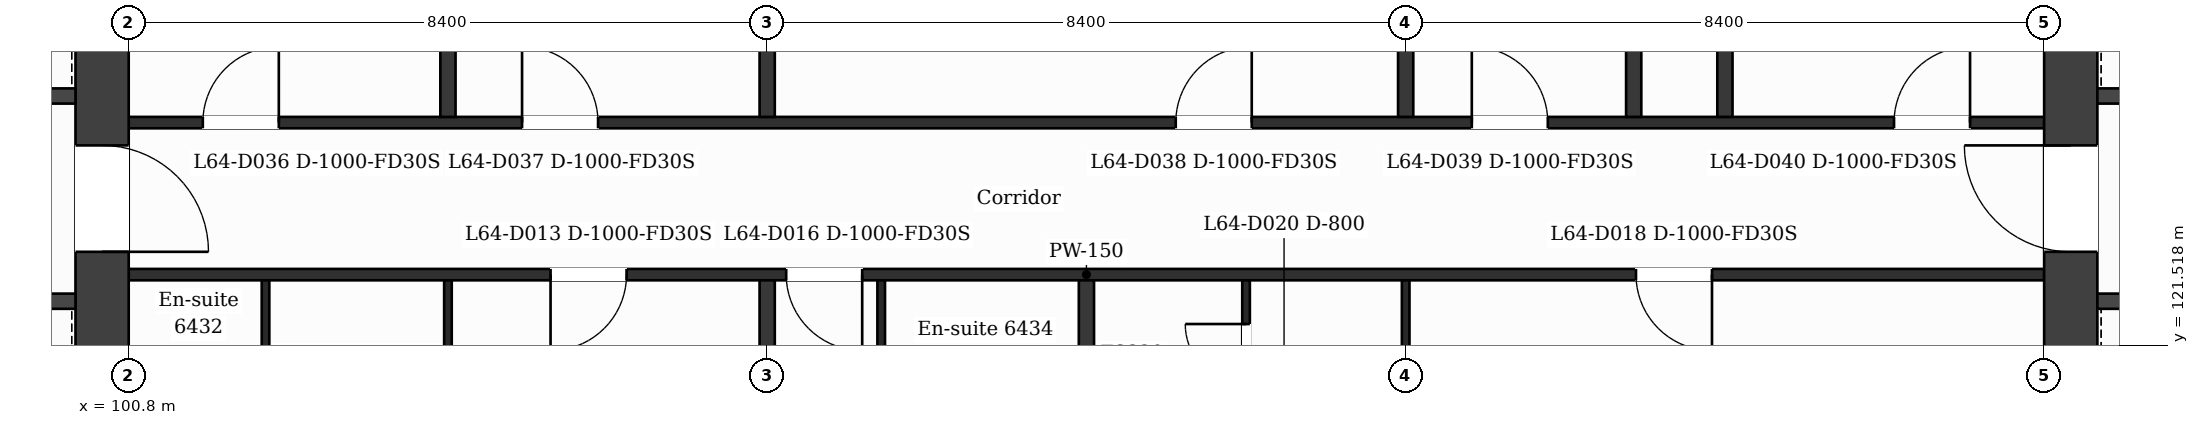
"""IFC4 building model, lengths in metres.
Left out: names, types, materials, properties, quantities, classifications, styles, units other than length and angle.
Written with IfcOpenShell. Run it as: python <this file> out.ifc"""

import sys

from ifc_helpers import new_model, si_unit, direction, frame, frame_2d, origin, place, context, subcontext, project, spatial, rectangle, extrude, element, fill, save


model = new_model("IFC4")
c1 = context("Model", 3, precision=1e-05, world=origin(), true_north=direction((0.0, 1.0)))
c2 = subcontext(c1, "Body", "Model", "MODEL_VIEW")
j1 = project(units=[si_unit("LENGTHUNIT", "METRE"), si_unit("PLANEANGLEUNIT", "RADIAN")], contexts=[c1])
p1 = place(None, origin())
s1 = spatial("IfcSite", under=j1, at=p1, CompositionType="ELEMENT")
p2 = place(p1, origin())
s2 = spatial("IfcBuilding", under=s1, at=p2, CompositionType="ELEMENT")
p3 = place(p2, frame((0.0, 0.0, 266.4)))
s3 = spatial("IfcBuildingStorey", under=s2, at=p3, CompositionType="ELEMENT", Elevation=266.4)
p4 = place(p3, frame((100.45, 132.05, 0.0), z_axis=(0.0, 0.0, 1.0), x_axis=(0.0, -1.0, 0.0)))
e1 = element("IfcWall", 1, at=p4, inside=s3, PredefinedType="SHEAR", context=c2, shape_type="SweptSolid", body=[
    extrude(rectangle(XDim=21.3, YDim=0.7, at=frame_2d((10.65, 0.0))), origin(), (0.0, 0.0, 1.0), 3.7),
])
p5 = place(p4, frame((7.9, 0.0, 0.0)))
e2 = element("IfcOpeningElement", 2, at=p5, cuts=e1, PredefinedType="OPENING", context=c2, shape_type="SweptSolid", body=[
    extrude(rectangle(XDim=1.4, YDim=2.1, at=frame_2d((0.7, 1.05))), frame((0.0, 0.36, 0.0), z_axis=(0.0, -1.0, 0.0), x_axis=(1.0, 0.0, 0.0)), (0.0, 0.0, 1.0), 0.72),
])
p6 = place(p3, frame((126.35, 110.75, 0.0), z_axis=(0.0, 0.0, 1.0), x_axis=(0.0, 1.0, 0.0)))
e3 = element("IfcWall", 3, at=p6, inside=s3, PredefinedType="SHEAR", context=c2, shape_type="SweptSolid", body=[
    extrude(rectangle(XDim=21.3, YDim=0.7, at=frame_2d((10.65, 0.0))), origin(), (0.0, 0.0, 1.0), 3.7),
])
p7 = place(p6, frame((12.0, 0.0, 0.0)))
e4 = element("IfcOpeningElement", 4, at=p7, cuts=e3, PredefinedType="OPENING", context=c2, shape_type="SweptSolid", body=[
    extrude(rectangle(XDim=1.4, YDim=2.1, at=frame_2d((0.7, 1.05))), frame((0.0, 0.36, 0.0), z_axis=(0.0, -1.0, 0.0), x_axis=(1.0, 0.0, 0.0)), (0.0, 0.0, 1.0), 0.72),
])
p8 = place(p3, frame((95.227, 122.1, 0.0), z_axis=(0.0, 0.0, 1.0), x_axis=(1.0, 0.0, 0.0)))
e5 = element("IfcWall", 5, at=p8, inside=s3, PredefinedType="PARTITIONING", context=c2, shape_type="SweptSolid", body=[
    extrude(rectangle(XDim=4.873, YDim=0.2, at=frame_2d((2.437, 0.0))), origin(), (0.0, 0.0, 1.0), 3.38),
])
p9 = place(p8, frame((0.827, 0.0, 0.0)))
e6 = element("IfcOpeningElement", 6, at=p9, cuts=e5, PredefinedType="OPENING", context=c2, shape_type="SweptSolid", body=[
    extrude(rectangle(XDim=1.1, YDim=2.1, at=frame_2d((0.55, 1.05))), frame((0.0, 0.11, 0.0), z_axis=(0.0, -1.0, 0.0), x_axis=(1.0, 0.0, 0.0)), (0.0, 0.0, 1.0), 0.22),
])
p10 = place(p8, frame((2.946, 0.0, 0.0)))
e7 = element("IfcOpeningElement", 7, at=p10, cuts=e5, PredefinedType="OPENING", context=c2, shape_type="SweptSolid", body=[
    extrude(rectangle(XDim=1.1, YDim=2.1, at=frame_2d((0.55, 1.05))), frame((0.0, 0.11, 0.0), z_axis=(0.0, -1.0, 0.0), x_axis=(1.0, 0.0, 0.0)), (0.0, 0.0, 1.0), 0.22),
])
p11 = place(p3, frame((126.7, 122.1, 0.0), z_axis=(0.0, 0.0, 1.0), x_axis=(1.0, 0.0, 0.0)))
e8 = element("IfcWall", 8, at=p11, inside=s3, PredefinedType="PARTITIONING", context=c2, shape_type="SweptSolid", body=[
    extrude(rectangle(XDim=4.873, YDim=0.2, at=frame_2d((2.437, 0.0))), origin(), (0.0, 0.0, 1.0), 3.38),
])
p12 = place(p11, frame((3.105, 0.0, 0.0)))
e9 = element("IfcOpeningElement", 9, at=p12, cuts=e8, PredefinedType="OPENING", context=c2, shape_type="SweptSolid", body=[
    extrude(rectangle(XDim=1.1, YDim=2.1, at=frame_2d((0.55, 1.05))), frame((0.0, 0.11, 0.0), z_axis=(0.0, -1.0, 0.0), x_axis=(1.0, 0.0, 0.0)), (0.0, 0.0, 1.0), 0.22),
])
p13 = place(p11, frame((0.509, 0.0, 0.0)))
e10 = element("IfcOpeningElement", 10, at=p13, cuts=e8, PredefinedType="OPENING", context=c2, shape_type="SweptSolid", body=[
    extrude(rectangle(XDim=1.1, YDim=2.1, at=frame_2d((0.55, 1.05))), frame((0.0, 0.11, 0.0), z_axis=(0.0, -1.0, 0.0), x_axis=(1.0, 0.0, 0.0)), (0.0, 0.0, 1.0), 0.22),
])
p14 = place(p3, frame((100.8, 122.45, 0.0), z_axis=(0.0, 0.0, 1.0), x_axis=(1.0, 0.0, 0.0)))
e11 = element("IfcWall", 11, at=p14, inside=s3, PredefinedType="PARTITIONING", context=c2, shape_type="SweptSolid", body=[
    extrude(rectangle(XDim=25.2, YDim=0.15, at=frame_2d((12.6, 0.0))), origin(), (0.0, 0.0, 1.0), 3.38),
])
p15 = place(p14, frame((5.55, 0.0, 0.0)))
e12 = element("IfcOpeningElement", 12, at=p15, cuts=e11, PredefinedType="OPENING", context=c2, shape_type="SweptSolid", body=[
    extrude(rectangle(XDim=1.0, YDim=2.1, at=frame_2d((0.5, 1.05))), frame((0.0, 0.085, 0.0), z_axis=(0.0, -1.0, 0.0), x_axis=(1.0, 0.0, 0.0)), (0.0, 0.0, 1.0), 0.17),
])
p16 = place(p14, frame((8.65, 0.0, 0.0)))
e13 = element("IfcOpeningElement", 13, at=p16, cuts=e11, PredefinedType="OPENING", context=c2, shape_type="SweptSolid", body=[
    extrude(rectangle(XDim=1.0, YDim=2.1, at=frame_2d((0.5, 1.05))), frame((0.0, 0.085, 0.0), z_axis=(0.0, -1.0, 0.0), x_axis=(1.0, 0.0, 0.0)), (0.0, 0.0, 1.0), 0.17),
])
p17 = place(p14, frame((19.83, 0.0, 0.0)))
e14 = element("IfcOpeningElement", 14, at=p17, cuts=e11, PredefinedType="OPENING", context=c2, shape_type="SweptSolid", body=[
    extrude(rectangle(XDim=1.0, YDim=2.1, at=frame_2d((0.5, 1.05))), frame((0.0, 0.085, 0.0), z_axis=(0.0, -1.0, 0.0), x_axis=(1.0, 0.0, 0.0)), (0.0, 0.0, 1.0), 0.17),
])
p18 = place(p3, frame((100.8, 124.45, 0.0), z_axis=(0.0, 0.0, 1.0), x_axis=(1.0, 0.0, 0.0)))
e15 = element("IfcWall", 15, at=p18, inside=s3, PredefinedType="PARTITIONING", context=c2, shape_type="SweptSolid", body=[
    extrude(rectangle(XDim=25.2, YDim=0.15, at=frame_2d((12.6, 0.0))), origin(), (0.0, 0.0, 1.0), 3.38),
])
p19 = place(p18, frame((0.975, 0.0, 0.0)))
e16 = element("IfcOpeningElement", 16, at=p19, cuts=e15, PredefinedType="OPENING", context=c2, shape_type="SweptSolid", body=[
    extrude(rectangle(XDim=1.0, YDim=2.1, at=frame_2d((0.5, 1.05))), frame((0.0, 0.085, 0.0), z_axis=(0.0, -1.0, 0.0), x_axis=(1.0, 0.0, 0.0)), (0.0, 0.0, 1.0), 0.17),
])
p20 = place(p18, frame((5.175, 0.0, 0.0)))
e17 = element("IfcOpeningElement", 17, at=p20, cuts=e15, PredefinedType="OPENING", context=c2, shape_type="SweptSolid", body=[
    extrude(rectangle(XDim=1.0, YDim=2.1, at=frame_2d((0.5, 1.05))), frame((0.0, 0.085, 0.0), z_axis=(0.0, -1.0, 0.0), x_axis=(1.0, 0.0, 0.0)), (0.0, 0.0, 1.0), 0.17),
])
p21 = place(p18, frame((13.775, 0.0, 0.0)))
e18 = element("IfcOpeningElement", 18, at=p21, cuts=e15, PredefinedType="OPENING", context=c2, shape_type="SweptSolid", body=[
    extrude(rectangle(XDim=1.0, YDim=2.1, at=frame_2d((0.5, 1.05))), frame((0.0, 0.085, 0.0), z_axis=(0.0, -1.0, 0.0), x_axis=(1.0, 0.0, 0.0)), (0.0, 0.0, 1.0), 0.17),
])
p22 = place(p18, frame((17.67, 0.0, 0.0)))
e19 = element("IfcOpeningElement", 19, at=p22, cuts=e15, PredefinedType="OPENING", context=c2, shape_type="SweptSolid", body=[
    extrude(rectangle(XDim=1.0, YDim=2.1, at=frame_2d((0.5, 1.05))), frame((0.0, 0.085, 0.0), z_axis=(0.0, -1.0, 0.0), x_axis=(1.0, 0.0, 0.0)), (0.0, 0.0, 1.0), 0.17),
])
p23 = place(p18, frame((23.225, 0.0, 0.0)))
e20 = element("IfcOpeningElement", 20, at=p23, cuts=e15, PredefinedType="OPENING", context=c2, shape_type="SweptSolid", body=[
    extrude(rectangle(XDim=1.0, YDim=2.1, at=frame_2d((0.5, 1.05))), frame((0.0, 0.085, 0.0), z_axis=(0.0, -1.0, 0.0), x_axis=(1.0, 0.0, 0.0)), (0.0, 0.0, 1.0), 0.17),
])
p24 = place(p3, frame((92.702, 124.8, 0.0), z_axis=(0.0, 0.0, 1.0), x_axis=(1.0, 0.0, 0.0)))
e21 = element("IfcWall", 21, at=p24, inside=s3, PredefinedType="PARTITIONING", context=c2, shape_type="SweptSolid", body=[
    extrude(rectangle(XDim=7.398, YDim=0.2, at=frame_2d((3.699, 0.0))), origin(), (0.0, 0.0, 1.0), 3.38),
])
p25 = place(p24, frame((5.636, 0.0, 0.0)))
e22 = element("IfcOpeningElement", 22, at=p25, cuts=e21, PredefinedType="OPENING", context=c2, shape_type="SweptSolid", body=[
    extrude(rectangle(XDim=1.1, YDim=2.1, at=frame_2d((0.55, 1.05))), frame((0.0, 0.11, 0.0), z_axis=(0.0, -1.0, 0.0), x_axis=(1.0, 0.0, 0.0)), (0.0, 0.0, 1.0), 0.22),
])
p26 = place(p3, frame((126.7, 124.8, 0.0), z_axis=(0.0, 0.0, 1.0), x_axis=(1.0, 0.0, 0.0)))
e23 = element("IfcWall", 23, at=p26, inside=s3, PredefinedType="PARTITIONING", context=c2, shape_type="SweptSolid", body=[
    extrude(rectangle(XDim=4.849, YDim=0.2, at=frame_2d((2.424, 0.0))), origin(), (0.0, 0.0, 1.0), 3.38),
])
p27 = place(p26, frame((0.725, 0.0, 0.0)))
e24 = element("IfcOpeningElement", 24, at=p27, cuts=e23, PredefinedType="OPENING", context=c2, shape_type="SweptSolid", body=[
    extrude(rectangle(XDim=1.1, YDim=2.1, at=frame_2d((0.55, 1.05))), frame((0.0, 0.11, 0.0), z_axis=(0.0, -1.0, 0.0), x_axis=(1.0, 0.0, 0.0)), (0.0, 0.0, 1.0), 0.22),
])
p28 = place(p3, frame((102.6, 119.8, 0.0), z_axis=(0.0, 0.0, 1.0), x_axis=(0.0, 1.0, 0.0)))
e25 = element("IfcWall", 25, at=p28, inside=s3, PredefinedType="PARTITIONING", context=c2, shape_type="SweptSolid", body=[
    extrude(rectangle(XDim=2.575, YDim=0.1, at=frame_2d((1.288, 0.0))), origin(), (0.0, 0.0, 1.0), 3.38),
])
p29 = place(p28, frame((0.78, 0.0, 0.0)))
e26 = element("IfcOpeningElement", 26, at=p29, cuts=e25, PredefinedType="OPENING", context=c2, shape_type="SweptSolid", body=[
    extrude(rectangle(XDim=0.8, YDim=2.1, at=frame_2d((0.4, 1.05))), frame((0.0, 0.06, 0.0), z_axis=(0.0, -1.0, 0.0), x_axis=(1.0, 0.0, 0.0)), (0.0, 0.0, 1.0), 0.12),
])
p30 = place(p3, frame((105.0, 110.55, 0.0), z_axis=(0.0, 0.0, 1.0), x_axis=(0.0, 1.0, 0.0)))
e27 = element("IfcWall", 27, at=p30, inside=s3, PredefinedType="PARTITIONING", context=c2, shape_type="SweptSolid", body=[
    extrude(rectangle(XDim=11.825, YDim=0.1, at=frame_2d((5.913, 0.0))), origin(), (0.0, 0.0, 1.0), 3.38),
])
p31 = place(p30, frame((9.09, 0.0, 0.0)))
e28 = element("IfcOpeningElement", 28, at=p31, cuts=e27, PredefinedType="OPENING", context=c2, shape_type="SweptSolid", body=[
    extrude(rectangle(XDim=0.9, YDim=2.1, at=frame_2d((0.45, 1.05))), frame((0.0, 0.06, 0.0), z_axis=(0.0, -1.0, 0.0), x_axis=(1.0, 0.0, 0.0)), (0.0, 0.0, 1.0), 0.12),
])
p32 = place(p3, frame((105.0, 124.525, 0.0), z_axis=(0.0, 0.0, 1.0), x_axis=(0.0, 1.0, 0.0)))
e29 = element("IfcWall", 29, at=p32, inside=s3, PredefinedType="PARTITIONING", context=c2, shape_type="SweptSolid", body=[
    extrude(rectangle(XDim=9.2, YDim=0.2, at=frame_2d((4.6, 0.0))), origin(), (0.0, 0.0, 1.0), 3.38),
])
p33 = place(p3, frame((109.2, 110.55, 0.0), z_axis=(0.0, 0.0, 1.0), x_axis=(0.0, 1.0, 0.0)))
e30 = element("IfcWall", 30, at=p33, inside=s3, PredefinedType="PARTITIONING", context=c2, shape_type="SweptSolid", body=[
    extrude(rectangle(XDim=11.825, YDim=0.2, at=frame_2d((5.913, 0.0))), origin(), (0.0, 0.0, 1.0), 3.38),
])
p34 = place(p3, frame((109.2, 124.525, 0.0), z_axis=(0.0, 0.0, 1.0), x_axis=(0.0, 1.0, 0.0)))
e31 = element("IfcWall", 31, at=p34, inside=s3, PredefinedType="PARTITIONING", context=c2, shape_type="SweptSolid", body=[
    extrude(rectangle(XDim=9.2, YDim=0.2, at=frame_2d((4.6, 0.0))), origin(), (0.0, 0.0, 1.0), 3.38),
])
p35 = place(p3, frame((110.7, 120.4, 0.0), z_axis=(0.0, 0.0, 1.0), x_axis=(0.0, 1.0, 0.0)))
e32 = element("IfcWall", 32, at=p35, inside=s3, PredefinedType="PARTITIONING", context=c2, shape_type="SweptSolid", body=[
    extrude(rectangle(XDim=1.975, YDim=0.1, at=frame_2d((0.988, 0.0))), origin(), (0.0, 0.0, 1.0), 3.38),
])
p36 = place(p3, frame((113.4, 110.55, 0.0), z_axis=(0.0, 0.0, 1.0), x_axis=(0.0, 1.0, 0.0)))
e33 = element("IfcWall", 33, at=p36, inside=s3, PredefinedType="PARTITIONING", context=c2, shape_type="SweptSolid", body=[
    extrude(rectangle(XDim=11.825, YDim=0.2, at=frame_2d((5.913, 0.0))), origin(), (0.0, 0.0, 1.0), 3.38),
])
p37 = place(p3, frame((115.5, 119.8, 0.0), z_axis=(0.0, 0.0, 1.0), x_axis=(0.0, 1.0, 0.0)))
e34 = element("IfcWall", 34, at=p37, inside=s3, PredefinedType="PARTITIONING", context=c2, shape_type="SweptSolid", body=[
    extrude(rectangle(XDim=2.575, YDim=0.1, at=frame_2d((1.288, 0.0))), origin(), (0.0, 0.0, 1.0), 3.38),
])
p38 = place(p37, frame((1.2, 0.0, 0.0)))
e35 = element("IfcOpeningElement", 35, at=p38, cuts=e34, PredefinedType="OPENING", context=c2, shape_type="SweptSolid", body=[
    extrude(rectangle(XDim=0.8, YDim=2.1, at=frame_2d((0.4, 1.05))), frame((0.0, 0.06, 0.0), z_axis=(0.0, -1.0, 0.0), x_axis=(1.0, 0.0, 0.0)), (0.0, 0.0, 1.0), 0.12),
])
p39 = place(p3, frame((117.6, 110.55, 0.0), z_axis=(0.0, 0.0, 1.0), x_axis=(0.0, 1.0, 0.0)))
e36 = element("IfcWall", 36, at=p39, inside=s3, PredefinedType="PARTITIONING", context=c2, shape_type="SweptSolid", body=[
    extrude(rectangle(XDim=11.825, YDim=0.1, at=frame_2d((5.913, 0.0))), origin(), (0.0, 0.0, 1.0), 3.38),
])
p40 = place(p39, frame((9.09, 0.0, 0.0)))
e37 = element("IfcOpeningElement", 37, at=p40, cuts=e36, PredefinedType="OPENING", context=c2, shape_type="SweptSolid", body=[
    extrude(rectangle(XDim=0.9, YDim=2.1, at=frame_2d((0.45, 1.05))), frame((0.0, 0.06, 0.0), z_axis=(0.0, -1.0, 0.0), x_axis=(1.0, 0.0, 0.0)), (0.0, 0.0, 1.0), 0.12),
])
p41 = place(p3, frame((117.6, 124.525, 0.0), z_axis=(0.0, 0.0, 1.0), x_axis=(0.0, 1.0, 0.0)))
e38 = element("IfcWall", 38, at=p41, inside=s3, PredefinedType="PARTITIONING", context=c2, shape_type="SweptSolid", body=[
    extrude(rectangle(XDim=9.2, YDim=0.2, at=frame_2d((4.6, 0.0))), origin(), (0.0, 0.0, 1.0), 3.38),
])
p42 = place(p3, frame((120.6, 124.525, 0.0), z_axis=(0.0, 0.0, 1.0), x_axis=(0.0, 1.0, 0.0)))
e39 = element("IfcWall", 39, at=p42, inside=s3, PredefinedType="PARTITIONING", context=c2, shape_type="SweptSolid", body=[
    extrude(rectangle(XDim=5.825, YDim=0.2, at=frame_2d((2.913, 0.0))), origin(), (0.0, 0.0, 1.0), 3.38),
])
p43 = place(p3, frame((121.8, 124.525, 0.0), z_axis=(0.0, 0.0, 1.0), x_axis=(0.0, 1.0, 0.0)))
e40 = element("IfcWall", 40, at=p43, inside=s3, PredefinedType="PARTITIONING", context=c2, shape_type="SweptSolid", body=[
    extrude(rectangle(XDim=9.2, YDim=0.2, at=frame_2d((4.6, 0.0))), origin(), (0.0, 0.0, 1.0), 3.38),
])
p44 = place(p15, origin())
e41 = element("IfcDoor", 41, at=p44, inside=s3, OperationType="SINGLE_SWING_LEFT", PredefinedType="DOOR", context=c2, shape_type="SweptSolid", body=[
    extrude(rectangle(XDim=1.0, YDim=2.1, at=frame_2d((0.5, 1.05))), frame((0.0, 0.025, 0.0), z_axis=(0.0, -1.0, 0.0), x_axis=(1.0, 0.0, 0.0)), (0.0, 0.0, 1.0), 0.05),
])
fill(e12, e41)
p45 = place(p16, origin())
e42 = element("IfcDoor", 42, at=p45, inside=s3, OperationType="SINGLE_SWING_RIGHT", PredefinedType="DOOR", context=c2, shape_type="SweptSolid", body=[
    extrude(rectangle(XDim=1.0, YDim=2.1, at=frame_2d((0.5, 1.05))), frame((0.0, 0.025, 0.0), z_axis=(0.0, -1.0, 0.0), x_axis=(1.0, 0.0, 0.0)), (0.0, 0.0, 1.0), 0.05),
])
fill(e13, e42)
p46 = place(p17, origin())
e43 = element("IfcDoor", 43, at=p46, inside=s3, OperationType="SINGLE_SWING_RIGHT", PredefinedType="DOOR", context=c2, shape_type="SweptSolid", body=[
    extrude(rectangle(XDim=1.0, YDim=2.1, at=frame_2d((0.5, 1.05))), frame((0.0, 0.025, 0.0), z_axis=(0.0, -1.0, 0.0), x_axis=(1.0, 0.0, 0.0)), (0.0, 0.0, 1.0), 0.05),
])
fill(e14, e43)
p47 = place(p38, origin())
e44 = element("IfcDoor", 44, at=p47, inside=s3, OperationType="SINGLE_SWING_RIGHT", PredefinedType="DOOR", context=c2, shape_type="SweptSolid", body=[
    extrude(rectangle(XDim=0.8, YDim=2.1, at=frame_2d((0.4, 1.05))), frame((0.0, 0.025, 0.0), z_axis=(0.0, -1.0, 0.0), x_axis=(1.0, 0.0, 0.0)), (0.0, 0.0, 1.0), 0.05),
])
fill(e35, e44)
p48 = place(p19, origin())
e45 = element("IfcDoor", 45, at=p48, inside=s3, OperationType="SINGLE_SWING_RIGHT", PredefinedType="DOOR", context=c2, shape_type="SweptSolid", body=[
    extrude(rectangle(XDim=1.0, YDim=2.1, at=frame_2d((0.5, 1.05))), frame((0.0, 0.025, 0.0), z_axis=(0.0, -1.0, 0.0), x_axis=(1.0, 0.0, 0.0)), (0.0, 0.0, 1.0), 0.05),
])
fill(e16, e45)
p49 = place(p20, origin())
e46 = element("IfcDoor", 46, at=p49, inside=s3, OperationType="SINGLE_SWING_LEFT", PredefinedType="DOOR", context=c2, shape_type="SweptSolid", body=[
    extrude(rectangle(XDim=1.0, YDim=2.1, at=frame_2d((0.5, 1.05))), frame((0.0, 0.025, 0.0), z_axis=(0.0, -1.0, 0.0), x_axis=(1.0, 0.0, 0.0)), (0.0, 0.0, 1.0), 0.05),
])
fill(e17, e46)
p50 = place(p21, origin())
e47 = element("IfcDoor", 47, at=p50, inside=s3, OperationType="SINGLE_SWING_RIGHT", PredefinedType="DOOR", context=c2, shape_type="SweptSolid", body=[
    extrude(rectangle(XDim=1.0, YDim=2.1, at=frame_2d((0.5, 1.05))), frame((0.0, 0.025, 0.0), z_axis=(0.0, -1.0, 0.0), x_axis=(1.0, 0.0, 0.0)), (0.0, 0.0, 1.0), 0.05),
])
fill(e18, e47)
p51 = place(p22, origin())
e48 = element("IfcDoor", 48, at=p51, inside=s3, OperationType="SINGLE_SWING_LEFT", PredefinedType="DOOR", context=c2, shape_type="SweptSolid", body=[
    extrude(rectangle(XDim=1.0, YDim=2.1, at=frame_2d((0.5, 1.05))), frame((0.0, 0.025, 0.0), z_axis=(0.0, -1.0, 0.0), x_axis=(1.0, 0.0, 0.0)), (0.0, 0.0, 1.0), 0.05),
])
fill(e19, e48)
p52 = place(p23, origin())
e49 = element("IfcDoor", 49, at=p52, inside=s3, OperationType="SINGLE_SWING_RIGHT", PredefinedType="DOOR", context=c2, shape_type="SweptSolid", body=[
    extrude(rectangle(XDim=1.0, YDim=2.1, at=frame_2d((0.5, 1.05))), frame((0.0, 0.025, 0.0), z_axis=(0.0, -1.0, 0.0), x_axis=(1.0, 0.0, 0.0)), (0.0, 0.0, 1.0), 0.05),
])
fill(e20, e49)
p53 = place(p5, origin())
e50 = element("IfcDoor", 50, at=p53, inside=s3, OperationType="SINGLE_SWING_RIGHT", PredefinedType="DOOR", context=c2, shape_type="SweptSolid", body=[
    extrude(rectangle(XDim=1.4, YDim=2.1, at=frame_2d((0.7, 1.05))), frame((0.0, 0.025, 0.0), z_axis=(0.0, -1.0, 0.0), x_axis=(1.0, 0.0, 0.0)), (0.0, 0.0, 1.0), 0.05),
])
fill(e2, e50)
p54 = place(p7, origin())
e51 = element("IfcDoor", 51, at=p54, inside=s3, OperationType="SINGLE_SWING_RIGHT", PredefinedType="DOOR", context=c2, shape_type="SweptSolid", body=[
    extrude(rectangle(XDim=1.4, YDim=2.1, at=frame_2d((0.7, 1.05))), frame((0.0, 0.025, 0.0), z_axis=(0.0, -1.0, 0.0), x_axis=(1.0, 0.0, 0.0)), (0.0, 0.0, 1.0), 0.05),
])
fill(e4, e51)
save(model, sys.argv[1])
